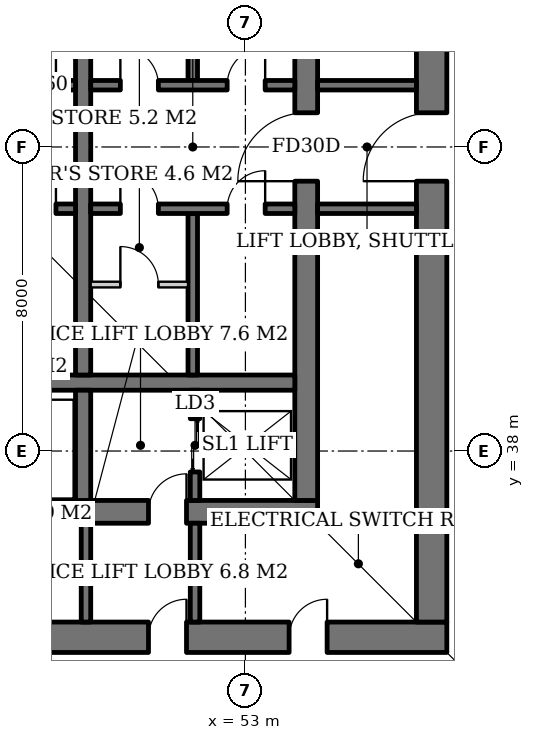
"""IFC4 building model, lengths in metres.
Left out: names, types, materials, properties, quantities, classifications, styles, units other than length and angle.
Written with IfcOpenShell. Run it as: python <this file> out.ifc"""

import sys

from ifc_helpers import new_model, si_unit, direction, frame, frame_2d, origin, place, context, subcontext, project, spatial, rectangle, extrude, element, fill, save


model = new_model("IFC4")
c1 = context("Model", 3, precision=1e-05, world=origin(), true_north=direction((0.0, 1.0)))
c2 = subcontext(c1, "Body", "Model", "MODEL_VIEW")
j1 = project(units=[si_unit("LENGTHUNIT", "METRE"), si_unit("PLANEANGLEUNIT", "RADIAN")], contexts=[c1])
p1 = place(None, origin())
s1 = spatial("IfcSite", under=j1, at=p1, CompositionType="ELEMENT")
p2 = place(p1, origin())
s2 = spatial("IfcBuilding", under=s1, at=p2, CompositionType="ELEMENT")
p3 = place(p2, frame((0.0, 0.0, -10.0)))
s3 = spatial("IfcBuildingStorey", under=s2, at=p3, CompositionType="ELEMENT", Elevation=-10.0)
p4 = place(p3, frame((35.1, 36.4, 0.0), z_axis=(0.0, 0.0, 1.0), x_axis=(1.0, 0.0, 0.0)))
e1 = element("IfcWall", 1, at=p4, inside=s3, PredefinedType="SHEAR", context=c2, shape_type="SweptSolid", body=[
    extrude(rectangle(XDim=19.8, YDim=0.6, at=frame_2d((9.9, 0.0))), origin(), (0.0, 0.0, 1.0), 5.0),
])
p5 = place(p4, frame((3.9, 0.0, 0.0)))
e2 = element("IfcOpeningElement", 2, at=p5, cuts=e1, PredefinedType="OPENING", context=c2, shape_type="SweptSolid", body=[
    extrude(rectangle(XDim=1.0, YDim=2.1, at=frame_2d((0.5, 1.05))), frame((0.0, 0.31, 0.0), z_axis=(0.0, -1.0, 0.0), x_axis=(1.0, 0.0, 0.0)), (0.0, 0.0, 1.0), 0.62),
])
p6 = place(p4, frame((15.35, 0.0, 0.0)))
e3 = element("IfcOpeningElement", 3, at=p6, cuts=e1, PredefinedType="OPENING", context=c2, shape_type="SweptSolid", body=[
    extrude(rectangle(XDim=1.0, YDim=2.1, at=frame_2d((0.5, 1.05))), frame((0.0, 0.31, 0.0), z_axis=(0.0, -1.0, 0.0), x_axis=(1.0, 0.0, 0.0)), (0.0, 0.0, 1.0), 0.62),
])
p7 = place(p3, frame((54.6, 36.7, 0.0), z_axis=(0.0, 0.0, 1.0), x_axis=(0.0, 1.0, 0.0)))
e4 = element("IfcWall", 4, at=p7, inside=s3, PredefinedType="SHEAR", context=c2, shape_type="SweptSolid", body=[
    extrude(rectangle(XDim=18.6, YDim=0.6, at=frame_2d((9.3, 0.0))), origin(), (0.0, 0.0, 1.0), 5.0),
])
p8 = place(p7, frame((8.4, 0.0, 0.0)))
e5 = element("IfcOpeningElement", 5, at=p8, cuts=e4, PredefinedType="OPENING", context=c2, shape_type="SweptSolid", body=[
    extrude(rectangle(XDim=1.8, YDim=2.4, at=frame_2d((0.9, 1.2))), frame((0.0, 0.31, 0.0), z_axis=(0.0, -1.0, 0.0), x_axis=(1.0, 0.0, 0.0)), (0.0, 0.0, 1.0), 0.62),
])
p9 = place(p3, frame((31.7, 33.1, 0.0), z_axis=(0.0, 0.0, 1.0), x_axis=(1.0, 0.0, 0.0)))
e6 = element("IfcWall", 6, at=p9, inside=s3, PredefinedType="SHEAR", context=c2, shape_type="SweptSolid", body=[
    extrude(rectangle(XDim=26.6, YDim=0.8, at=frame_2d((13.3, 0.0))), origin(), (0.0, 0.0, 1.0), 5.0),
])
p10 = place(p9, frame((7.3, 0.0, 0.0)))
e7 = element("IfcOpeningElement", 7, at=p10, cuts=e6, PredefinedType="OPENING", context=c2, shape_type="SweptSolid", body=[
    extrude(rectangle(XDim=1.0, YDim=2.1, at=frame_2d((0.5, 1.05))), frame((0.0, 0.41, 0.0), z_axis=(0.0, -1.0, 0.0), x_axis=(1.0, 0.0, 0.0)), (0.0, 0.0, 1.0), 0.82),
])
p11 = place(p9, frame((18.75, 0.0, 0.0)))
e8 = element("IfcOpeningElement", 8, at=p11, cuts=e6, PredefinedType="OPENING", context=c2, shape_type="SweptSolid", body=[
    extrude(rectangle(XDim=1.0, YDim=2.1, at=frame_2d((0.5, 1.05))), frame((0.0, 0.41, 0.0), z_axis=(0.0, -1.0, 0.0), x_axis=(1.0, 0.0, 0.0)), (0.0, 0.0, 1.0), 0.82),
])
p12 = place(p9, frame((3.25, 0.0, 0.0)))
e9 = element("IfcOpeningElement", 9, at=p12, cuts=e6, PredefinedType="OPENING", context=c2, shape_type="SweptSolid", body=[
    extrude(rectangle(XDim=1.0, YDim=2.1, at=frame_2d((0.5, 1.05))), frame((0.0, 0.41, 0.0), z_axis=(0.0, -1.0, 0.0), x_axis=(1.0, 0.0, 0.0)), (0.0, 0.0, 1.0), 0.82),
])
p13 = place(p9, frame((10.42, 0.0, 0.0)))
e10 = element("IfcOpeningElement", 10, at=p13, cuts=e6, PredefinedType="OPENING", context=c2, shape_type="SweptSolid", body=[
    extrude(rectangle(XDim=1.0, YDim=2.1, at=frame_2d((0.5, 1.05))), frame((0.0, 0.41, 0.0), z_axis=(0.0, -1.0, 0.0), x_axis=(1.0, 0.0, 0.0)), (0.0, 0.0, 1.0), 0.82),
])
p14 = place(p9, frame((14.46, 0.0, 0.0)))
e11 = element("IfcOpeningElement", 11, at=p14, cuts=e6, PredefinedType="OPENING", context=c2, shape_type="SweptSolid", body=[
    extrude(rectangle(XDim=1.0, YDim=2.1, at=frame_2d((0.5, 1.05))), frame((0.0, 0.41, 0.0), z_axis=(0.0, -1.0, 0.0), x_axis=(1.0, 0.0, 0.0)), (0.0, 0.0, 1.0), 0.82),
])
p15 = place(p9, frame((22.45, 0.0, 0.0)))
e12 = element("IfcOpeningElement", 12, at=p15, cuts=e6, PredefinedType="OPENING", context=c2, shape_type="SweptSolid", body=[
    extrude(rectangle(XDim=1.0, YDim=2.1, at=frame_2d((0.5, 1.05))), frame((0.0, 0.41, 0.0), z_axis=(0.0, -1.0, 0.0), x_axis=(1.0, 0.0, 0.0)), (0.0, 0.0, 1.0), 0.82),
])
p16 = place(p3, frame((57.9, 33.5, 0.0), z_axis=(0.0, 0.0, 1.0), x_axis=(0.0, 1.0, 0.0)))
e13 = element("IfcWall", 13, at=p16, inside=s3, PredefinedType="SHEAR", context=c2, shape_type="SweptSolid", body=[
    extrude(rectangle(XDim=25.0, YDim=0.8, at=frame_2d((12.5, 0.0))), origin(), (0.0, 0.0, 1.0), 5.0),
])
p17 = place(p16, frame((11.6, 0.0, 0.0)))
e14 = element("IfcOpeningElement", 14, at=p17, cuts=e13, PredefinedType="OPENING", context=c2, shape_type="SweptSolid", body=[
    extrude(rectangle(XDim=1.8, YDim=2.4, at=frame_2d((0.9, 1.2))), frame((0.0, 0.41, 0.0), z_axis=(0.0, -1.0, 0.0), x_axis=(1.0, 0.0, 0.0)), (0.0, 0.0, 1.0), 0.82),
])
p18 = place(p3, frame((35.7, 39.8, 0.0), z_axis=(0.0, 0.0, 1.0), x_axis=(1.0, 0.0, 0.0)))
e15 = element("IfcWall", 15, at=p18, inside=s3, PredefinedType="SHEAR", context=c2, shape_type="SweptSolid", body=[
    extrude(rectangle(XDim=18.6, YDim=0.4, at=frame_2d((9.3, 0.0))), origin(), (0.0, 0.0, 1.0), 5.0),
])
p19 = place(p3, frame((48.73, 36.7, 0.0), z_axis=(0.0, 0.0, 1.0), x_axis=(0.0, 1.0, 0.0)))
e16 = element("IfcWall", 16, at=p19, inside=s3, PredefinedType="SHEAR", context=c2, shape_type="SweptSolid", body=[
    extrude(rectangle(XDim=2.9, YDim=0.4, at=frame_2d((1.45, 0.0))), origin(), (0.0, 0.0, 1.0), 5.0),
])
p20 = place(p3, frame((48.73, 40.0, 0.0), z_axis=(0.0, 0.0, 1.0), x_axis=(0.0, 1.0, 0.0)))
e17 = element("IfcWall", 17, at=p20, inside=s3, PredefinedType="SHEAR", context=c2, shape_type="SweptSolid", body=[
    extrude(rectangle(XDim=12.0, YDim=0.4, at=frame_2d((6.0, 0.0))), origin(), (0.0, 0.0, 1.0), 5.0),
])
p21 = place(p3, frame((51.675, 36.7, 0.0), z_axis=(0.0, 0.0, 1.0), x_axis=(0.0, 1.0, 0.0)))
e18 = element("IfcWall", 18, at=p21, inside=s3, PredefinedType="SHEAR", context=c2, shape_type="SweptSolid", body=[
    extrude(rectangle(XDim=2.9, YDim=0.25, at=frame_2d((1.45, 0.0))), origin(), (0.0, 0.0, 1.0), 5.0),
])
p22 = place(p21, frame((0.75, 0.0, 0.0)))
e19 = element("IfcOpeningElement", 19, at=p22, cuts=e18, PredefinedType="OPENING", context=c2, shape_type="SweptSolid", body=[
    extrude(rectangle(XDim=1.4, YDim=2.4, at=frame_2d((0.7, 1.2))), frame((0.0, 0.135, 0.0), z_axis=(0.0, -1.0, 0.0), x_axis=(1.0, 0.0, 0.0)), (0.0, 0.0, 1.0), 0.27),
])
p23 = place(p3, frame((35.7, 47.625, 0.0), z_axis=(0.0, 0.0, 1.0), x_axis=(1.0, 0.0, 0.0)))
e20 = element("IfcWall", 20, at=p23, inside=s3, PredefinedType="SHEAR", context=c2, shape_type="SweptSolid", body=[
    extrude(rectangle(XDim=12.83, YDim=0.25, at=frame_2d((6.415, 0.0))), origin(), (0.0, 0.0, 1.0), 5.0),
])
p24 = place(p23, frame((0.75, 0.0, 0.0)))
e21 = element("IfcOpeningElement", 21, at=p24, cuts=e20, PredefinedType="OPENING", context=c2, shape_type="SweptSolid", body=[
    extrude(rectangle(XDim=1.0, YDim=2.1, at=frame_2d((0.5, 1.05))), frame((0.0, 0.135, 0.0), z_axis=(0.0, -1.0, 0.0), x_axis=(1.0, 0.0, 0.0)), (0.0, 0.0, 1.0), 0.27),
])
p25 = place(p23, frame((3.5, 0.0, 0.0)))
e22 = element("IfcOpeningElement", 22, at=p25, cuts=e20, PredefinedType="OPENING", context=c2, shape_type="SweptSolid", body=[
    extrude(rectangle(XDim=1.0, YDim=2.1, at=frame_2d((0.5, 1.05))), frame((0.0, 0.135, 0.0), z_axis=(0.0, -1.0, 0.0), x_axis=(1.0, 0.0, 0.0)), (0.0, 0.0, 1.0), 0.27),
])
p26 = place(p23, frame((6.25, 0.0, 0.0)))
e23 = element("IfcOpeningElement", 23, at=p26, cuts=e20, PredefinedType="OPENING", context=c2, shape_type="SweptSolid", body=[
    extrude(rectangle(XDim=1.0, YDim=2.1, at=frame_2d((0.5, 1.05))), frame((0.0, 0.135, 0.0), z_axis=(0.0, -1.0, 0.0), x_axis=(1.0, 0.0, 0.0)), (0.0, 0.0, 1.0), 0.27),
])
p27 = place(p23, frame((9.0, 0.0, 0.0)))
e24 = element("IfcOpeningElement", 24, at=p27, cuts=e20, PredefinedType="OPENING", context=c2, shape_type="SweptSolid", body=[
    extrude(rectangle(XDim=1.0, YDim=2.1, at=frame_2d((0.5, 1.05))), frame((0.0, 0.135, 0.0), z_axis=(0.0, -1.0, 0.0), x_axis=(1.0, 0.0, 0.0)), (0.0, 0.0, 1.0), 0.27),
])
p28 = place(p23, frame((11.515, 0.0, 0.0)))
e25 = element("IfcOpeningElement", 25, at=p28, cuts=e20, PredefinedType="OPENING", context=c2, shape_type="SweptSolid", body=[
    extrude(rectangle(XDim=0.8, YDim=2.0, at=frame_2d((0.4, 1.0))), frame((0.0, 0.135, 0.0), z_axis=(0.0, -1.0, 0.0), x_axis=(1.0, 0.0, 0.0)), (0.0, 0.0, 1.0), 0.27),
])
p29 = place(p3, frame((35.7, 44.375, 0.0), z_axis=(0.0, 0.0, 1.0), x_axis=(1.0, 0.0, 0.0)))
e26 = element("IfcWall", 26, at=p29, inside=s3, PredefinedType="SHEAR", context=c2, shape_type="SweptSolid", body=[
    extrude(rectangle(XDim=12.83, YDim=0.25, at=frame_2d((6.415, 0.0))), origin(), (0.0, 0.0, 1.0), 5.0),
])
p30 = place(p29, frame((0.75, 0.0, 0.0)))
e27 = element("IfcOpeningElement", 27, at=p30, cuts=e26, PredefinedType="OPENING", context=c2, shape_type="SweptSolid", body=[
    extrude(rectangle(XDim=1.0, YDim=2.1, at=frame_2d((0.5, 1.05))), frame((0.0, 0.135, 0.0), z_axis=(0.0, -1.0, 0.0), x_axis=(1.0, 0.0, 0.0)), (0.0, 0.0, 1.0), 0.27),
])
p31 = place(p29, frame((3.5, 0.0, 0.0)))
e28 = element("IfcOpeningElement", 28, at=p31, cuts=e26, PredefinedType="OPENING", context=c2, shape_type="SweptSolid", body=[
    extrude(rectangle(XDim=1.0, YDim=2.1, at=frame_2d((0.5, 1.05))), frame((0.0, 0.135, 0.0), z_axis=(0.0, -1.0, 0.0), x_axis=(1.0, 0.0, 0.0)), (0.0, 0.0, 1.0), 0.27),
])
p32 = place(p29, frame((6.25, 0.0, 0.0)))
e29 = element("IfcOpeningElement", 29, at=p32, cuts=e26, PredefinedType="OPENING", context=c2, shape_type="SweptSolid", body=[
    extrude(rectangle(XDim=1.0, YDim=2.1, at=frame_2d((0.5, 1.05))), frame((0.0, 0.135, 0.0), z_axis=(0.0, -1.0, 0.0), x_axis=(1.0, 0.0, 0.0)), (0.0, 0.0, 1.0), 0.27),
])
p33 = place(p29, frame((9.0, 0.0, 0.0)))
e30 = element("IfcOpeningElement", 30, at=p33, cuts=e26, PredefinedType="OPENING", context=c2, shape_type="SweptSolid", body=[
    extrude(rectangle(XDim=1.0, YDim=2.1, at=frame_2d((0.5, 1.05))), frame((0.0, 0.135, 0.0), z_axis=(0.0, -1.0, 0.0), x_axis=(1.0, 0.0, 0.0)), (0.0, 0.0, 1.0), 0.27),
])
p34 = place(p29, frame((11.515, 0.0, 0.0)))
e31 = element("IfcOpeningElement", 31, at=p34, cuts=e26, PredefinedType="OPENING", context=c2, shape_type="SweptSolid", body=[
    extrude(rectangle(XDim=0.8, YDim=2.0, at=frame_2d((0.4, 1.0))), frame((0.0, 0.135, 0.0), z_axis=(0.0, -1.0, 0.0), x_axis=(1.0, 0.0, 0.0)), (0.0, 0.0, 1.0), 0.27),
])
p35 = place(p3, frame((51.615, 47.75, 0.0), z_axis=(0.0, 0.0, 1.0), x_axis=(0.0, 1.0, 0.0)))
e32 = element("IfcWall", 32, at=p35, inside=s3, PredefinedType="SHEAR", context=c2, shape_type="SweptSolid", body=[
    extrude(rectangle(XDim=4.25, YDim=0.25, at=frame_2d((2.125, 0.0))), origin(), (0.0, 0.0, 1.0), 5.0),
])
p36 = place(p3, frame((48.93, 47.625, 0.0), z_axis=(0.0, 0.0, 1.0), x_axis=(1.0, 0.0, 0.0)))
e33 = element("IfcWall", 33, at=p36, inside=s3, PredefinedType="SHEAR", context=c2, shape_type="SweptSolid", body=[
    extrude(rectangle(XDim=5.37, YDim=0.25, at=frame_2d((2.685, 0.0))), origin(), (0.0, 0.0, 1.0), 5.0),
])
p37 = place(p36, frame((0.78, 0.0, 0.0)))
e34 = element("IfcOpeningElement", 34, at=p37, cuts=e33, PredefinedType="OPENING", context=c2, shape_type="SweptSolid", body=[
    extrude(rectangle(XDim=1.0, YDim=2.1, at=frame_2d((0.5, 1.05))), frame((0.0, 0.135, 0.0), z_axis=(0.0, -1.0, 0.0), x_axis=(1.0, 0.0, 0.0)), (0.0, 0.0, 1.0), 0.27),
])
p38 = place(p36, frame((3.59, 0.0, 0.0)))
e35 = element("IfcOpeningElement", 35, at=p38, cuts=e33, PredefinedType="OPENING", context=c2, shape_type="SweptSolid", body=[
    extrude(rectangle(XDim=1.0, YDim=2.1, at=frame_2d((0.5, 1.05))), frame((0.0, 0.135, 0.0), z_axis=(0.0, -1.0, 0.0), x_axis=(1.0, 0.0, 0.0)), (0.0, 0.0, 1.0), 0.27),
])
p39 = place(p3, frame((51.615, 44.25, 0.0), z_axis=(0.0, 0.0, 1.0), x_axis=(0.0, -1.0, 0.0)))
e36 = element("IfcWall", 36, at=p39, inside=s3, PredefinedType="SHEAR", context=c2, shape_type="SweptSolid", body=[
    extrude(rectangle(XDim=4.25, YDim=0.25, at=frame_2d((2.125, 0.0))), origin(), (0.0, 0.0, 1.0), 5.0),
])
p40 = place(p3, frame((48.93, 44.375, 0.0), z_axis=(0.0, 0.0, 1.0), x_axis=(1.0, 0.0, 0.0)))
e37 = element("IfcWall", 37, at=p40, inside=s3, PredefinedType="SHEAR", context=c2, shape_type="SweptSolid", body=[
    extrude(rectangle(XDim=5.37, YDim=0.25, at=frame_2d((2.685, 0.0))), origin(), (0.0, 0.0, 1.0), 5.0),
])
p41 = place(p40, frame((0.78, 0.0, 0.0)))
e38 = element("IfcOpeningElement", 38, at=p41, cuts=e37, PredefinedType="OPENING", context=c2, shape_type="SweptSolid", body=[
    extrude(rectangle(XDim=1.0, YDim=2.1, at=frame_2d((0.5, 1.05))), frame((0.0, 0.135, 0.0), z_axis=(0.0, -1.0, 0.0), x_axis=(1.0, 0.0, 0.0)), (0.0, 0.0, 1.0), 0.27),
])
p42 = place(p40, frame((3.59, 0.0, 0.0)))
e39 = element("IfcOpeningElement", 39, at=p42, cuts=e37, PredefinedType="OPENING", context=c2, shape_type="SweptSolid", body=[
    extrude(rectangle(XDim=1.0, YDim=2.1, at=frame_2d((0.5, 1.05))), frame((0.0, 0.135, 0.0), z_axis=(0.0, -1.0, 0.0), x_axis=(1.0, 0.0, 0.0)), (0.0, 0.0, 1.0), 0.27),
])
for number, where, z_axis, x_axis in (
    (40, (54.9, 44.375, 0.0), (0.0, 0.0, 1.0), (1.0, 0.0, 0.0)),
    (41, (54.9, 47.625, 0.0), (0.0, 0.0, 1.0), (1.0, 0.0, 0.0)),
    (42, (48.805, 33.5, 0.0), (0.0, 0.0, 1.0), (0.0, 1.0, 0.0)),
    (43, (51.675, 33.5, 0.0), (0.0, 0.0, 1.0), (0.0, 1.0, 0.0)),
):
    element("IfcWall", number, at=place(p3, frame(where, z_axis=z_axis, x_axis=x_axis)), inside=s3, PredefinedType="SOLIDWALL", context=c2, shape_type="SweptSolid", body=[
        extrude(rectangle(XDim=2.6, YDim=0.25, at=frame_2d((1.3, 0.0))), origin(), (0.0, 0.0, 1.0), 4.7),
    ])
p43 = place(p3, frame((48.93, 42.38, 0.0), z_axis=(0.0, 0.0, 1.0), x_axis=(1.0, 0.0, 0.0)))
e44 = element("IfcWall", 44, at=p43, inside=s3, PredefinedType="SOLIDWALL", context=c2, shape_type="SweptSolid", body=[
    extrude(rectangle(XDim=2.56, YDim=0.15, at=frame_2d((1.28, 0.0))), origin(), (0.0, 0.0, 1.0), 4.7),
])
p44 = place(p43, frame((0.78, 0.0, 0.0)))
e45 = element("IfcOpeningElement", 45, at=p44, cuts=e44, PredefinedType="OPENING", context=c2, shape_type="SweptSolid", body=[
    extrude(rectangle(XDim=1.0, YDim=2.1, at=frame_2d((0.5, 1.05))), frame((0.0, 0.085, 0.0), z_axis=(0.0, -1.0, 0.0), x_axis=(1.0, 0.0, 0.0)), (0.0, 0.0, 1.0), 0.17),
])
p45 = place(p22, origin())
e46 = element("IfcDoor", 46, at=p45, inside=s3, OperationType="DOUBLE_DOOR_SLIDING", PredefinedType="DOOR", context=c2, shape_type="SweptSolid", body=[
    extrude(rectangle(XDim=1.4, YDim=2.4, at=frame_2d((0.7, 1.2))), frame((0.0, 0.025, 0.0), z_axis=(0.0, -1.0, 0.0), x_axis=(1.0, 0.0, 0.0)), (0.0, 0.0, 1.0), 0.05),
])
fill(e19, e46)
p46 = place(p28, origin())
e47 = element("IfcDoor", 47, at=p46, inside=s3, OperationType="SINGLE_SWING_RIGHT", PredefinedType="DOOR", context=c2, shape_type="SweptSolid", body=[
    extrude(rectangle(XDim=0.8, YDim=2.0, at=frame_2d((0.4, 1.0))), frame((0.0, 0.025, 0.0), z_axis=(0.0, -1.0, 0.0), x_axis=(1.0, 0.0, 0.0)), (0.0, 0.0, 1.0), 0.05),
])
fill(e25, e47)
p47 = place(p34, origin())
e48 = element("IfcDoor", 48, at=p47, inside=s3, OperationType="SINGLE_SWING_RIGHT", PredefinedType="DOOR", context=c2, shape_type="SweptSolid", body=[
    extrude(rectangle(XDim=0.8, YDim=2.0, at=frame_2d((0.4, 1.0))), frame((0.0, 0.025, 0.0), z_axis=(0.0, -1.0, 0.0), x_axis=(1.0, 0.0, 0.0)), (0.0, 0.0, 1.0), 0.05),
])
fill(e31, e48)
p48 = place(p37, origin())
e49 = element("IfcDoor", 49, at=p48, inside=s3, OperationType="SINGLE_SWING_LEFT", PredefinedType="DOOR", context=c2, shape_type="SweptSolid", body=[
    extrude(rectangle(XDim=1.0, YDim=2.1, at=frame_2d((0.5, 1.05))), frame((0.0, 0.025, 0.0), z_axis=(0.0, -1.0, 0.0), x_axis=(1.0, 0.0, 0.0)), (0.0, 0.0, 1.0), 0.05),
])
fill(e34, e49)
p49 = place(p38, origin())
e50 = element("IfcDoor", 50, at=p49, inside=s3, OperationType="SINGLE_SWING_RIGHT", PredefinedType="DOOR", context=c2, shape_type="SweptSolid", body=[
    extrude(rectangle(XDim=1.0, YDim=2.1, at=frame_2d((0.5, 1.05))), frame((0.0, 0.025, 0.0), z_axis=(0.0, -1.0, 0.0), x_axis=(1.0, 0.0, 0.0)), (0.0, 0.0, 1.0), 0.05),
])
fill(e35, e50)
p50 = place(p41, origin())
e51 = element("IfcDoor", 51, at=p50, inside=s3, OperationType="SINGLE_SWING_LEFT", PredefinedType="DOOR", context=c2, shape_type="SweptSolid", body=[
    extrude(rectangle(XDim=1.0, YDim=2.1, at=frame_2d((0.5, 1.05))), frame((0.0, 0.025, 0.0), z_axis=(0.0, -1.0, 0.0), x_axis=(1.0, 0.0, 0.0)), (0.0, 0.0, 1.0), 0.05),
])
fill(e38, e51)
p51 = place(p42, origin())
e52 = element("IfcDoor", 52, at=p51, inside=s3, OperationType="SINGLE_SWING_RIGHT", PredefinedType="DOOR", context=c2, shape_type="SweptSolid", body=[
    extrude(rectangle(XDim=1.0, YDim=2.1, at=frame_2d((0.5, 1.05))), frame((0.0, 0.025, 0.0), z_axis=(0.0, -1.0, 0.0), x_axis=(1.0, 0.0, 0.0)), (0.0, 0.0, 1.0), 0.05),
])
fill(e39, e52)
p52 = place(p44, origin())
e53 = element("IfcDoor", 53, at=p52, inside=s3, OperationType="SINGLE_SWING_LEFT", PredefinedType="DOOR", context=c2, shape_type="SweptSolid", body=[
    extrude(rectangle(XDim=1.0, YDim=2.1, at=frame_2d((0.5, 1.05))), frame((0.0, 0.025, 0.0), z_axis=(0.0, -1.0, 0.0), x_axis=(1.0, 0.0, 0.0)), (0.0, 0.0, 1.0), 0.05),
])
fill(e45, e53)
p53 = place(p8, origin())
e54 = element("IfcDoor", 54, at=p53, inside=s3, OperationType="DOUBLE_DOOR_SINGLE_SWING", PredefinedType="DOOR", context=c2, shape_type="SweptSolid", body=[
    extrude(rectangle(XDim=1.8, YDim=2.4, at=frame_2d((0.9, 1.2))), frame((0.0, 0.025, 0.0), z_axis=(0.0, -1.0, 0.0), x_axis=(1.0, 0.0, 0.0)), (0.0, 0.0, 1.0), 0.05),
])
fill(e5, e54)
p54 = place(p6, origin())
e55 = element("IfcDoor", 55, at=p54, inside=s3, OperationType="SINGLE_SWING_RIGHT", PredefinedType="DOOR", context=c2, shape_type="SweptSolid", body=[
    extrude(rectangle(XDim=1.0, YDim=2.1, at=frame_2d((0.5, 1.05))), frame((0.0, 0.025, 0.0), z_axis=(0.0, -1.0, 0.0), x_axis=(1.0, 0.0, 0.0)), (0.0, 0.0, 1.0), 0.05),
])
fill(e3, e55)
p55 = place(p17, origin())
e56 = element("IfcDoor", 56, at=p55, inside=s3, OperationType="DOUBLE_DOOR_SINGLE_SWING", PredefinedType="DOOR", context=c2, shape_type="SweptSolid", body=[
    extrude(rectangle(XDim=1.8, YDim=2.4, at=frame_2d((0.9, 1.2))), frame((0.0, 0.025, 0.0), z_axis=(0.0, -1.0, 0.0), x_axis=(1.0, 0.0, 0.0)), (0.0, 0.0, 1.0), 0.05),
])
fill(e14, e56)
p56 = place(p11, origin())
e57 = element("IfcDoor", 57, at=p56, inside=s3, OperationType="SINGLE_SWING_RIGHT", PredefinedType="DOOR", context=c2, shape_type="SweptSolid", body=[
    extrude(rectangle(XDim=1.0, YDim=2.1, at=frame_2d((0.5, 1.05))), frame((0.0, 0.025, 0.0), z_axis=(0.0, -1.0, 0.0), x_axis=(1.0, 0.0, 0.0)), (0.0, 0.0, 1.0), 0.05),
])
fill(e8, e57)
p57 = place(p15, origin())
e58 = element("IfcDoor", 58, at=p57, inside=s3, OperationType="SINGLE_SWING_RIGHT", PredefinedType="DOOR", context=c2, shape_type="SweptSolid", body=[
    extrude(rectangle(XDim=1.0, YDim=2.1, at=frame_2d((0.5, 1.05))), frame((0.0, 0.39, 0.0), z_axis=(0.0, -1.0, 0.0), x_axis=(1.0, 0.0, 0.0)), (0.0, 0.0, 1.0), 0.05),
])
fill(e12, e58)
save(model, sys.argv[1])
